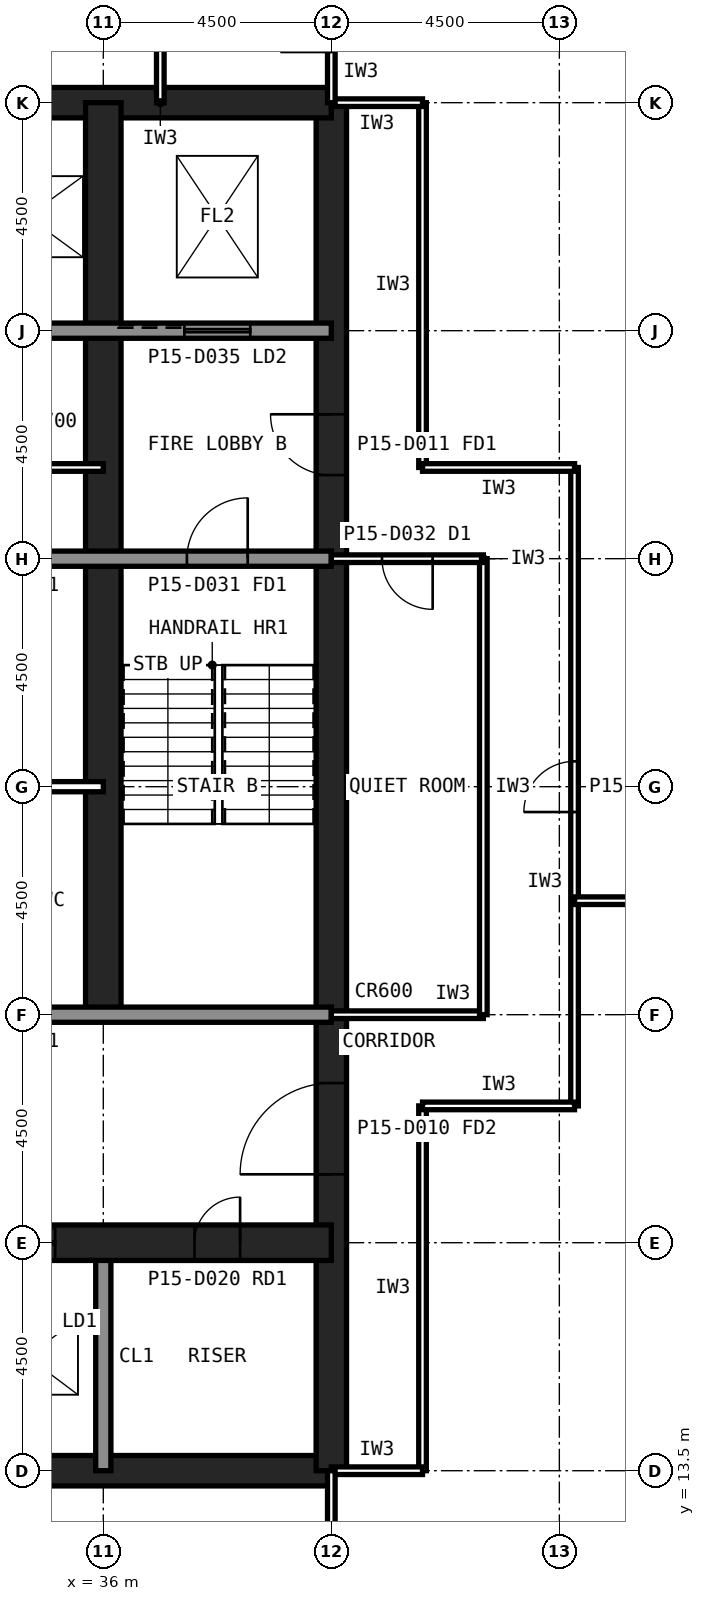
"""IFC4 building model, lengths in metres.
Left out: names, types, materials, properties, quantities, classifications, styles, units other than length and angle.
Written with IfcOpenShell. Run it as: python <this file> out.ifc"""

import sys

from ifc_helpers import new_model, si_unit, direction, frame, frame_2d, origin, place, context, subcontext, project, spatial, rectangle, extrude, element, fill, save


model = new_model("IFC4")
c1 = context("Model", 3, precision=1e-05, world=origin(), true_north=direction((0.0, 1.0)))
c2 = subcontext(c1, "Body", "Model", "MODEL_VIEW")
j1 = project(units=[si_unit("LENGTHUNIT", "METRE"), si_unit("PLANEANGLEUNIT", "RADIAN")], contexts=[c1])
p1 = place(None, origin())
s1 = spatial("IfcSite", under=j1, at=p1, CompositionType="ELEMENT")
p2 = place(p1, origin())
s2 = spatial("IfcBuilding", under=s1, at=p2, CompositionType="ELEMENT")
p3 = place(p2, frame((0.0, 0.0, 62.6)))
s3 = spatial("IfcBuildingStorey", under=s2, at=p3, CompositionType="ELEMENT", Elevation=62.6)
p4 = place(p3, frame((13.5, 13.5, 0.0), z_axis=(0.0, 0.0, 1.0), x_axis=(1.0, 0.0, 0.0)))
e1 = element("IfcWall", 1, at=p4, inside=s3, PredefinedType="SHEAR", context=c2, shape_type="SweptSolid", body=[
    extrude(rectangle(XDim=27.0, YDim=0.6, at=frame_2d((13.5, 0.0))), origin(), (0.0, 0.0, 1.0), 4.2),
])
p5 = place(p3, frame((40.5, 13.5, 0.0), z_axis=(0.0, 0.0, 1.0), x_axis=(0.0, 1.0, 0.0)))
e2 = element("IfcWall", 2, at=p5, inside=s3, PredefinedType="SHEAR", context=c2, shape_type="SweptSolid", body=[
    extrude(rectangle(XDim=27.0, YDim=0.6, at=frame_2d((13.5, 0.0))), origin(), (0.0, 0.0, 1.0), 4.2),
])
p6 = place(p5, frame((5.85, 0.0, 0.0)))
e3 = element("IfcOpeningElement", 3, at=p6, cuts=e2, PredefinedType="OPENING", context=c2, shape_type="SweptSolid", body=[
    extrude(rectangle(XDim=1.8, YDim=2.1, at=frame_2d((0.9, 1.05))), frame((0.0, 0.31, 0.0), z_axis=(0.0, -1.0, 0.0), x_axis=(1.0, 0.0, 0.0)), (0.0, 0.0, 1.0), 0.62),
])
p7 = place(p5, frame((19.65, 0.0, 0.0)))
e4 = element("IfcOpeningElement", 4, at=p7, cuts=e2, PredefinedType="OPENING", context=c2, shape_type="SweptSolid", body=[
    extrude(rectangle(XDim=1.2, YDim=2.1, at=frame_2d((0.6, 1.05))), frame((0.0, 0.31, 0.0), z_axis=(0.0, -1.0, 0.0), x_axis=(1.0, 0.0, 0.0)), (0.0, 0.0, 1.0), 0.62),
])
p8 = place(p3, frame((40.5, 40.5, 0.0), z_axis=(0.0, 0.0, 1.0), x_axis=(-1.0, 0.0, 0.0)))
e5 = element("IfcWall", 5, at=p8, inside=s3, PredefinedType="SHEAR", context=c2, shape_type="SweptSolid", body=[
    extrude(rectangle(XDim=27.0, YDim=0.6, at=frame_2d((13.5, 0.0))), origin(), (0.0, 0.0, 1.0), 4.2),
])
p9 = place(p3, frame((36.0, 13.5, 0.0), z_axis=(0.0, 0.0, 1.0), x_axis=(0.0, 1.0, 0.0)))
e6 = element("IfcWall", 6, at=p9, inside=s3, PredefinedType="SOLIDWALL", context=c2, shape_type="SweptSolid", body=[
    extrude(rectangle(XDim=4.5, YDim=0.3, at=frame_2d((2.25, 0.0))), origin(), (0.0, 0.0, 1.0), 4.04),
])
p10 = place(p3, frame((36.0, 22.5, 0.0), z_axis=(0.0, 0.0, 1.0), x_axis=(0.0, 1.0, 0.0)))
e7 = element("IfcWall", 7, at=p10, inside=s3, PredefinedType="SHEAR", context=c2, shape_type="SweptSolid", body=[
    extrude(rectangle(XDim=18.0, YDim=0.7, at=frame_2d((9.0, 0.0))), origin(), (0.0, 0.0, 1.0), 4.2),
])
p11 = place(p3, frame((13.5, 18.0, 0.0), z_axis=(0.0, 0.0, 1.0), x_axis=(1.0, 0.0, 0.0)))
e8 = element("IfcWall", 8, at=p11, inside=s3, PredefinedType="SHEAR", context=c2, shape_type="SweptSolid", body=[
    extrude(rectangle(XDim=27.0, YDim=0.7, at=frame_2d((13.5, 0.0))), origin(), (0.0, 0.0, 1.0), 4.2),
])
p12 = place(p11, frame((24.3, 0.0, 0.0)))
e9 = element("IfcOpeningElement", 9, at=p12, cuts=e8, PredefinedType="OPENING", context=c2, shape_type="SweptSolid", body=[
    extrude(rectangle(XDim=0.9, YDim=2.1, at=frame_2d((0.45, 1.05))), frame((0.0, 0.36, 0.0), z_axis=(0.0, -1.0, 0.0), x_axis=(1.0, 0.0, 0.0)), (0.0, 0.0, 1.0), 0.72),
])
p13 = place(p11, frame((5.45, 0.0, 0.0)))
e10 = element("IfcOpeningElement", 10, at=p13, cuts=e8, PredefinedType="OPENING", context=c2, shape_type="SweptSolid", body=[
    extrude(rectangle(XDim=1.1, YDim=2.1, at=frame_2d((0.55, 1.05))), frame((0.0, 0.36, 0.0), z_axis=(0.0, -1.0, 0.0), x_axis=(1.0, 0.0, 0.0)), (0.0, 0.0, 1.0), 0.72),
])
p14 = place(p11, frame((8.45, 0.0, 0.0)))
e11 = element("IfcOpeningElement", 11, at=p14, cuts=e8, PredefinedType="OPENING", context=c2, shape_type="SweptSolid", body=[
    extrude(rectangle(XDim=1.1, YDim=2.1, at=frame_2d((0.55, 1.05))), frame((0.0, 0.36, 0.0), z_axis=(0.0, -1.0, 0.0), x_axis=(1.0, 0.0, 0.0)), (0.0, 0.0, 1.0), 0.72),
])
p15 = place(p11, frame((11.45, 0.0, 0.0)))
e12 = element("IfcOpeningElement", 12, at=p15, cuts=e8, PredefinedType="OPENING", context=c2, shape_type="SweptSolid", body=[
    extrude(rectangle(XDim=1.1, YDim=2.1, at=frame_2d((0.55, 1.05))), frame((0.0, 0.36, 0.0), z_axis=(0.0, -1.0, 0.0), x_axis=(1.0, 0.0, 0.0)), (0.0, 0.0, 1.0), 0.72),
])
p16 = place(p11, frame((14.45, 0.0, 0.0)))
e13 = element("IfcOpeningElement", 13, at=p16, cuts=e8, PredefinedType="OPENING", context=c2, shape_type="SweptSolid", body=[
    extrude(rectangle(XDim=1.1, YDim=2.1, at=frame_2d((0.55, 1.05))), frame((0.0, 0.36, 0.0), z_axis=(0.0, -1.0, 0.0), x_axis=(1.0, 0.0, 0.0)), (0.0, 0.0, 1.0), 0.72),
])
p17 = place(p11, frame((17.45, 0.0, 0.0)))
e14 = element("IfcOpeningElement", 14, at=p17, cuts=e8, PredefinedType="OPENING", context=c2, shape_type="SweptSolid", body=[
    extrude(rectangle(XDim=1.1, YDim=2.1, at=frame_2d((0.55, 1.05))), frame((0.0, 0.36, 0.0), z_axis=(0.0, -1.0, 0.0), x_axis=(1.0, 0.0, 0.0)), (0.0, 0.0, 1.0), 0.72),
])
p18 = place(p11, frame((20.45, 0.0, 0.0)))
e15 = element("IfcOpeningElement", 15, at=p18, cuts=e8, PredefinedType="OPENING", context=c2, shape_type="SweptSolid", body=[
    extrude(rectangle(XDim=1.1, YDim=2.1, at=frame_2d((0.55, 1.05))), frame((0.0, 0.36, 0.0), z_axis=(0.0, -1.0, 0.0), x_axis=(1.0, 0.0, 0.0)), (0.0, 0.0, 1.0), 0.72),
])
p19 = place(p11, frame((1.6, 0.0, 0.0)))
e16 = element("IfcOpeningElement", 16, at=p19, cuts=e8, PredefinedType="OPENING", context=c2, shape_type="SweptSolid", body=[
    extrude(rectangle(XDim=1.3, YDim=2.2, at=frame_2d((0.65, 1.1))), frame((0.0, 0.36, 0.0), z_axis=(0.0, -1.0, 0.0), x_axis=(1.0, 0.0, 0.0)), (0.0, 0.0, 1.0), 0.72),
])
p20 = place(p3, frame((13.5, 36.0, 0.0), z_axis=(0.0, 0.0, 1.0), x_axis=(1.0, 0.0, 0.0)))
e17 = element("IfcWall", 17, at=p20, inside=s3, PredefinedType="SOLIDWALL", context=c2, shape_type="SweptSolid", body=[
    extrude(rectangle(XDim=27.0, YDim=0.3, at=frame_2d((13.5, 0.0))), origin(), (0.0, 0.0, 1.0), 4.04),
])
p21 = place(p20, frame((1.8, 0.0, 0.0)))
e18 = element("IfcOpeningElement", 18, at=p21, cuts=e17, PredefinedType="OPENING", context=c2, shape_type="SweptSolid", body=[
    extrude(rectangle(XDim=0.9, YDim=2.1, at=frame_2d((0.45, 1.05))), frame((0.0, 0.16, 0.0), z_axis=(0.0, -1.0, 0.0), x_axis=(1.0, 0.0, 0.0)), (0.0, 0.0, 1.0), 0.32),
])
p22 = place(p20, frame((24.1, 0.0, 0.0)))
e19 = element("IfcOpeningElement", 19, at=p22, cuts=e17, PredefinedType="OPENING", context=c2, shape_type="SweptSolid", body=[
    extrude(rectangle(XDim=1.3, YDim=2.2, at=frame_2d((0.65, 1.1))), frame((0.0, 0.16, 0.0), z_axis=(0.0, -1.0, 0.0), x_axis=(1.0, 0.0, 0.0)), (0.0, 0.0, 1.0), 0.32),
])
p23 = place(p3, frame((13.5, 22.5, 0.0), z_axis=(0.0, 0.0, 1.0), x_axis=(1.0, 0.0, 0.0)))
e20 = element("IfcWall", 20, at=p23, inside=s3, PredefinedType="SOLIDWALL", context=c2, shape_type="SweptSolid", body=[
    extrude(rectangle(XDim=27.0, YDim=0.3, at=frame_2d((13.5, 0.0))), origin(), (0.0, 0.0, 1.0), 4.04),
])
p24 = place(p23, frame((1.65, 0.0, 0.0)))
e21 = element("IfcOpeningElement", 21, at=p24, cuts=e20, PredefinedType="OPENING", context=c2, shape_type="SweptSolid", body=[
    extrude(rectangle(XDim=1.2, YDim=2.1, at=frame_2d((0.6, 1.05))), frame((0.0, 0.16, 0.0), z_axis=(0.0, -1.0, 0.0), x_axis=(1.0, 0.0, 0.0)), (0.0, 0.0, 1.0), 0.32),
])
p25 = place(p23, frame((6.025, 0.0, 0.0)))
e22 = element("IfcOpeningElement", 22, at=p25, cuts=e20, PredefinedType="OPENING", context=c2, shape_type="SweptSolid", body=[
    extrude(rectangle(XDim=1.0, YDim=2.1, at=frame_2d((0.5, 1.05))), frame((0.0, 0.16, 0.0), z_axis=(0.0, -1.0, 0.0), x_axis=(1.0, 0.0, 0.0)), (0.0, 0.0, 1.0), 0.32),
])
p26 = place(p23, frame((10.525, 0.0, 0.0)))
e23 = element("IfcOpeningElement", 23, at=p26, cuts=e20, PredefinedType="OPENING", context=c2, shape_type="SweptSolid", body=[
    extrude(rectangle(XDim=1.0, YDim=2.1, at=frame_2d((0.5, 1.05))), frame((0.0, 0.16, 0.0), z_axis=(0.0, -1.0, 0.0), x_axis=(1.0, 0.0, 0.0)), (0.0, 0.0, 1.0), 0.32),
])
p27 = place(p23, frame((19.75, 0.0, 0.0)))
e24 = element("IfcOpeningElement", 24, at=p27, cuts=e20, PredefinedType="OPENING", context=c2, shape_type="SweptSolid", body=[
    extrude(rectangle(XDim=1.0, YDim=2.1, at=frame_2d((0.5, 1.05))), frame((0.0, 0.16, 0.0), z_axis=(0.0, -1.0, 0.0), x_axis=(1.0, 0.0, 0.0)), (0.0, 0.0, 1.0), 0.32),
])
p28 = place(p23, frame((15.05, 0.0, 0.0)))
e25 = element("IfcOpeningElement", 25, at=p28, cuts=e20, PredefinedType="OPENING", context=c2, shape_type="SweptSolid", body=[
    extrude(rectangle(XDim=1.4, YDim=2.4, at=frame_2d((0.7, 1.2))), frame((0.0, 0.16, 0.0), z_axis=(0.0, -1.0, 0.0), x_axis=(1.0, 0.0, 0.0)), (0.0, 0.0, 1.0), 0.32),
])
p29 = place(p3, frame((13.5, 31.5, 0.0), z_axis=(0.0, 0.0, 1.0), x_axis=(1.0, 0.0, 0.0)))
e26 = element("IfcWall", 26, at=p29, inside=s3, PredefinedType="SOLIDWALL", context=c2, shape_type="SweptSolid", body=[
    extrude(rectangle(XDim=27.0, YDim=0.3, at=frame_2d((13.5, 0.0))), origin(), (0.0, 0.0, 1.0), 4.04),
])
p30 = place(p29, frame((24.15, 0.0, 0.0)))
e27 = element("IfcOpeningElement", 27, at=p30, cuts=e26, PredefinedType="OPENING", context=c2, shape_type="SweptSolid", body=[
    extrude(rectangle(XDim=1.2, YDim=2.1, at=frame_2d((0.6, 1.05))), frame((0.0, 0.16, 0.0), z_axis=(0.0, -1.0, 0.0), x_axis=(1.0, 0.0, 0.0)), (0.0, 0.0, 1.0), 0.32),
])
p31 = place(p29, frame((15.3, 0.0, 0.0)))
e28 = element("IfcOpeningElement", 28, at=p31, cuts=e26, PredefinedType="OPENING", context=c2, shape_type="SweptSolid", body=[
    extrude(rectangle(XDim=0.9, YDim=2.1, at=frame_2d((0.45, 1.05))), frame((0.0, 0.16, 0.0), z_axis=(0.0, -1.0, 0.0), x_axis=(1.0, 0.0, 0.0)), (0.0, 0.0, 1.0), 0.32),
])
p32 = place(p29, frame((19.8, 0.0, 0.0)))
e29 = element("IfcOpeningElement", 29, at=p32, cuts=e26, PredefinedType="OPENING", context=c2, shape_type="SweptSolid", body=[
    extrude(rectangle(XDim=0.9, YDim=2.1, at=frame_2d((0.45, 1.05))), frame((0.0, 0.16, 0.0), z_axis=(0.0, -1.0, 0.0), x_axis=(1.0, 0.0, 0.0)), (0.0, 0.0, 1.0), 0.32),
])
p33 = place(p3, frame((27.0, 27.0, 0.0), z_axis=(0.0, 0.0, 1.0), x_axis=(1.0, 0.0, 0.0)))
e30 = element("IfcWall", 30, at=p33, inside=s3, PredefinedType="PARTITIONING", context=c2, shape_type="SweptSolid", body=[
    extrude(rectangle(XDim=9.0, YDim=0.2, at=frame_2d((4.5, 0.0))), origin(), (0.0, 0.0, 1.0), 4.04),
])
p34 = place(p3, frame((45.3, 20.7, 0.0), z_axis=(0.0, 0.0, 1.0), x_axis=(0.0, 1.0, 0.0)))
e31 = element("IfcWall", 31, at=p34, inside=s3, PredefinedType="PARTITIONING", context=c2, shape_type="SweptSolid", body=[
    extrude(rectangle(XDim=12.6, YDim=0.15, at=frame_2d((6.3, 0.0))), origin(), (0.0, 0.0, 1.0), 4.04),
])
p35 = place(p34, frame((5.8, 0.0, 0.0)))
e32 = element("IfcOpeningElement", 32, at=p35, cuts=e31, PredefinedType="OPENING", context=c2, shape_type="SweptSolid", body=[
    extrude(rectangle(XDim=1.0, YDim=2.1, at=frame_2d((0.5, 1.05))), frame((0.0, 0.085, 0.0), z_axis=(0.0, -1.0, 0.0), x_axis=(1.0, 0.0, 0.0)), (0.0, 0.0, 1.0), 0.17),
])
for number, where, z_axis, x_axis in (
    (33, (42.3, 13.5, 0.0), (0.0, 0.0, 1.0), (0.0, 1.0, 0.0)),
    (34, (42.3, 33.3, 0.0), (0.0, 0.0, 1.0), (0.0, 1.0, 0.0)),
):
    element("IfcWall", number, at=place(p3, frame(where, z_axis=z_axis, x_axis=x_axis)), inside=s3, PredefinedType="PARTITIONING", context=c2, shape_type="SweptSolid", body=[
        extrude(rectangle(XDim=7.2, YDim=0.15, at=frame_2d((3.6, 0.0))), origin(), (0.0, 0.0, 1.0), 4.04),
    ])
for number, where, z_axis, x_axis in (
    (35, (42.3, 20.7, 0.0), (0.0, 0.0, 1.0), (1.0, 0.0, 0.0)),
    (36, (45.3, 33.3, 0.0), (0.0, 0.0, 1.0), (-1.0, 0.0, 0.0)),
):
    element("IfcWall", number, at=place(p3, frame(where, z_axis=z_axis, x_axis=x_axis)), inside=s3, PredefinedType="PARTITIONING", context=c2, shape_type="SweptSolid", body=[
        extrude(rectangle(XDim=3.0, YDim=0.15, at=frame_2d((1.5, 0.0))), origin(), (0.0, 0.0, 1.0), 4.04),
    ])
for number, where, z_axis, x_axis in (
    (37, (40.5, 13.5, 0.0), (0.0, 0.0, 1.0), (1.0, 0.0, 0.0)),
    (38, (42.3, 40.5, 0.0), (0.0, 0.0, 1.0), (-1.0, 0.0, 0.0)),
):
    element("IfcWall", number, at=place(p3, frame(where, z_axis=z_axis, x_axis=x_axis)), inside=s3, PredefinedType="PARTITIONING", context=c2, shape_type="SweptSolid", body=[
        extrude(rectangle(XDim=1.8, YDim=0.15, at=frame_2d((0.9, 0.0))), origin(), (0.0, 0.0, 1.0), 3.189),
    ])
p36 = place(p3, frame((37.125, 40.5, 0.0), z_axis=(0.0, 0.0, 1.0), x_axis=(0.0, 1.0, 0.0)))
e39 = element("IfcWall", 39, at=p36, inside=s3, PredefinedType="PARTITIONING", context=c2, shape_type="SweptSolid", body=[
    extrude(rectangle(XDim=3.0, YDim=0.15, at=frame_2d((1.5, 0.0))), origin(), (0.0, 0.0, 1.0), 4.04),
])
p37 = place(p3, frame((40.5, 40.5, 0.0), z_axis=(0.0, 0.0, 1.0), x_axis=(0.0, 1.0, 0.0)))
e40 = element("IfcWall", 40, at=p37, inside=s3, PredefinedType="PARTITIONING", context=c2, shape_type="SweptSolid", body=[
    extrude(rectangle(XDim=3.0, YDim=0.15, at=frame_2d((1.5, 0.0))), origin(), (0.0, 0.0, 1.0), 3.189),
])
p38 = place(p37, frame((1.0, 0.0, 0.0)))
e41 = element("IfcOpeningElement", 41, at=p38, cuts=e40, PredefinedType="OPENING", context=c2, shape_type="SweptSolid", body=[
    extrude(rectangle(XDim=1.0, YDim=2.1, at=frame_2d((0.5, 1.05))), frame((0.0, 0.085, 0.0), z_axis=(0.0, -1.0, 0.0), x_axis=(1.0, 0.0, 0.0)), (0.0, 0.0, 1.0), 0.17),
])
p39 = place(p3, frame((40.5, 9.0, 0.0), z_axis=(0.0, 0.0, 1.0), x_axis=(0.0, 1.0, 0.0)))
e42 = element("IfcWall", 42, at=p39, inside=s3, PredefinedType="PARTITIONING", context=c2, shape_type="SweptSolid", body=[
    extrude(rectangle(XDim=4.5, YDim=0.15, at=frame_2d((2.25, 0.0))), origin(), (0.0, 0.0, 1.0), 3.189),
])
p40 = place(p3, frame((40.5, 22.5, 0.0), z_axis=(0.0, 0.0, 1.0), x_axis=(1.0, 0.0, 0.0)))
e43 = element("IfcWall", 43, at=p40, inside=s3, PredefinedType="PARTITIONING", context=c2, shape_type="SweptSolid", body=[
    extrude(rectangle(XDim=3.0, YDim=0.15, at=frame_2d((1.5, 0.0))), origin(), (0.0, 0.0, 1.0), 3.189),
])
p41 = place(p3, frame((43.5, 22.5, 0.0), z_axis=(0.0, 0.0, 1.0), x_axis=(0.0, 1.0, 0.0)))
e44 = element("IfcWall", 44, at=p41, inside=s3, PredefinedType="PARTITIONING", context=c2, shape_type="SweptSolid", body=[
    extrude(rectangle(XDim=9.0, YDim=0.15, at=frame_2d((4.5, 0.0))), origin(), (0.0, 0.0, 1.0), 4.04),
])
p42 = place(p3, frame((43.5, 31.5, 0.0), z_axis=(0.0, 0.0, 1.0), x_axis=(-1.0, 0.0, 0.0)))
e45 = element("IfcWall", 45, at=p42, inside=s3, PredefinedType="PARTITIONING", context=c2, shape_type="SweptSolid", body=[
    extrude(rectangle(XDim=3.0, YDim=0.15, at=frame_2d((1.5, 0.0))), origin(), (0.0, 0.0, 1.0), 3.189),
])
p43 = place(p42, frame((1.0, 0.0, 0.0)))
e46 = element("IfcOpeningElement", 46, at=p43, cuts=e45, PredefinedType="OPENING", context=c2, shape_type="SweptSolid", body=[
    extrude(rectangle(XDim=1.0, YDim=2.1, at=frame_2d((0.5, 1.05))), frame((0.0, 0.085, 0.0), z_axis=(0.0, -1.0, 0.0), x_axis=(1.0, 0.0, 0.0)), (0.0, 0.0, 1.0), 0.17),
])
p44 = place(p3, frame((54.52, 24.75, 0.0), z_axis=(0.0, 0.0, 1.0), x_axis=(-1.0, 0.0, 0.0)))
e47 = element("IfcWall", 47, at=p44, inside=s3, PredefinedType="PARTITIONING", context=c2, shape_type="SweptSolid", body=[
    extrude(rectangle(XDim=9.22, YDim=0.15, at=frame_2d((4.61, 0.0))), origin(), (0.0, 0.0, 1.0), 4.04),
])
p45 = place(p44, frame((4.37, 0.0, 0.0)))
e48 = element("IfcOpeningElement", 48, at=p45, cuts=e47, PredefinedType="OPENING", context=c2, shape_type="SweptSolid", body=[
    extrude(rectangle(XDim=1.0, YDim=2.1, at=frame_2d((0.5, 1.05))), frame((0.0, 0.085, 0.0), z_axis=(0.0, -1.0, 0.0), x_axis=(1.0, 0.0, 0.0)), (0.0, 0.0, 1.0), 0.17),
])
p46 = place(p6, origin())
e49 = element("IfcDoor", 49, at=p46, inside=s3, OperationType="SINGLE_SWING_LEFT", PredefinedType="DOOR", context=c2, shape_type="SweptSolid", body=[
    extrude(rectangle(XDim=1.8, YDim=2.1, at=frame_2d((0.9, 1.05))), frame((0.0, 0.025, 0.0), z_axis=(0.0, -1.0, 0.0), x_axis=(1.0, 0.0, 0.0)), (0.0, 0.0, 1.0), 0.05),
])
fill(e3, e49)
p47 = place(p7, origin())
e50 = element("IfcDoor", 50, at=p47, inside=s3, OperationType="SINGLE_SWING_RIGHT", PredefinedType="DOOR", context=c2, shape_type="SweptSolid", body=[
    extrude(rectangle(XDim=1.2, YDim=2.1, at=frame_2d((0.6, 1.05))), frame((0.0, 0.025, 0.0), z_axis=(0.0, -1.0, 0.0), x_axis=(1.0, 0.0, 0.0)), (0.0, 0.0, 1.0), 0.05),
])
fill(e4, e50)
p48 = place(p30, origin())
e51 = element("IfcDoor", 51, at=p48, inside=s3, OperationType="SINGLE_SWING_RIGHT", PredefinedType="DOOR", context=c2, shape_type="SweptSolid", body=[
    extrude(rectangle(XDim=1.2, YDim=2.1, at=frame_2d((0.6, 1.05))), frame((0.0, 0.025, 0.0), z_axis=(0.0, -1.0, 0.0), x_axis=(1.0, 0.0, 0.0)), (0.0, 0.0, 1.0), 0.05),
])
fill(e27, e51)
p49 = place(p12, origin())
e52 = element("IfcDoor", 52, at=p49, inside=s3, OperationType="SINGLE_SWING_RIGHT", PredefinedType="DOOR", context=c2, shape_type="SweptSolid", body=[
    extrude(rectangle(XDim=0.9, YDim=2.1, at=frame_2d((0.45, 1.05))), frame((0.0, 0.025, 0.0), z_axis=(0.0, -1.0, 0.0), x_axis=(1.0, 0.0, 0.0)), (0.0, 0.0, 1.0), 0.05),
])
fill(e9, e52)
p50 = place(p18, origin())
e53 = element("IfcDoor", 53, at=p50, inside=s3, OperationType="SLIDING_TO_LEFT", PredefinedType="DOOR", context=c2, shape_type="SweptSolid", body=[
    extrude(rectangle(XDim=1.1, YDim=2.1, at=frame_2d((0.55, 1.05))), frame((0.0, 0.025, 0.0), z_axis=(0.0, -1.0, 0.0), x_axis=(1.0, 0.0, 0.0)), (0.0, 0.0, 1.0), 0.05),
])
fill(e15, e53)
p51 = place(p22, origin())
e54 = element("IfcDoor", 54, at=p51, inside=s3, OperationType="SLIDING_TO_LEFT", PredefinedType="DOOR", context=c2, shape_type="SweptSolid", body=[
    extrude(rectangle(XDim=1.3, YDim=2.2, at=frame_2d((0.65, 1.1))), frame((0.0, 0.025, 0.0), z_axis=(0.0, -1.0, 0.0), x_axis=(1.0, 0.0, 0.0)), (0.0, 0.0, 1.0), 0.05),
])
fill(e19, e54)
p52 = place(p35, origin())
e55 = element("IfcDoor", 55, at=p52, inside=s3, OperationType="SINGLE_SWING_LEFT", PredefinedType="DOOR", context=c2, shape_type="SweptSolid", body=[
    extrude(rectangle(XDim=1.0, YDim=2.1, at=frame_2d((0.5, 1.05))), frame((0.0, 0.025, 0.0), z_axis=(0.0, -1.0, 0.0), x_axis=(1.0, 0.0, 0.0)), (0.0, 0.0, 1.0), 0.05),
])
fill(e32, e55)
p53 = place(p43, origin())
e56 = element("IfcDoor", 56, at=p53, inside=s3, OperationType="SINGLE_SWING_LEFT", PredefinedType="DOOR", context=c2, shape_type="SweptSolid", body=[
    extrude(rectangle(XDim=1.0, YDim=2.1, at=frame_2d((0.5, 1.05))), frame((0.0, 0.025, 0.0), z_axis=(0.0, -1.0, 0.0), x_axis=(1.0, 0.0, 0.0)), (0.0, 0.0, 1.0), 0.05),
])
fill(e46, e56)
save(model, sys.argv[1])
